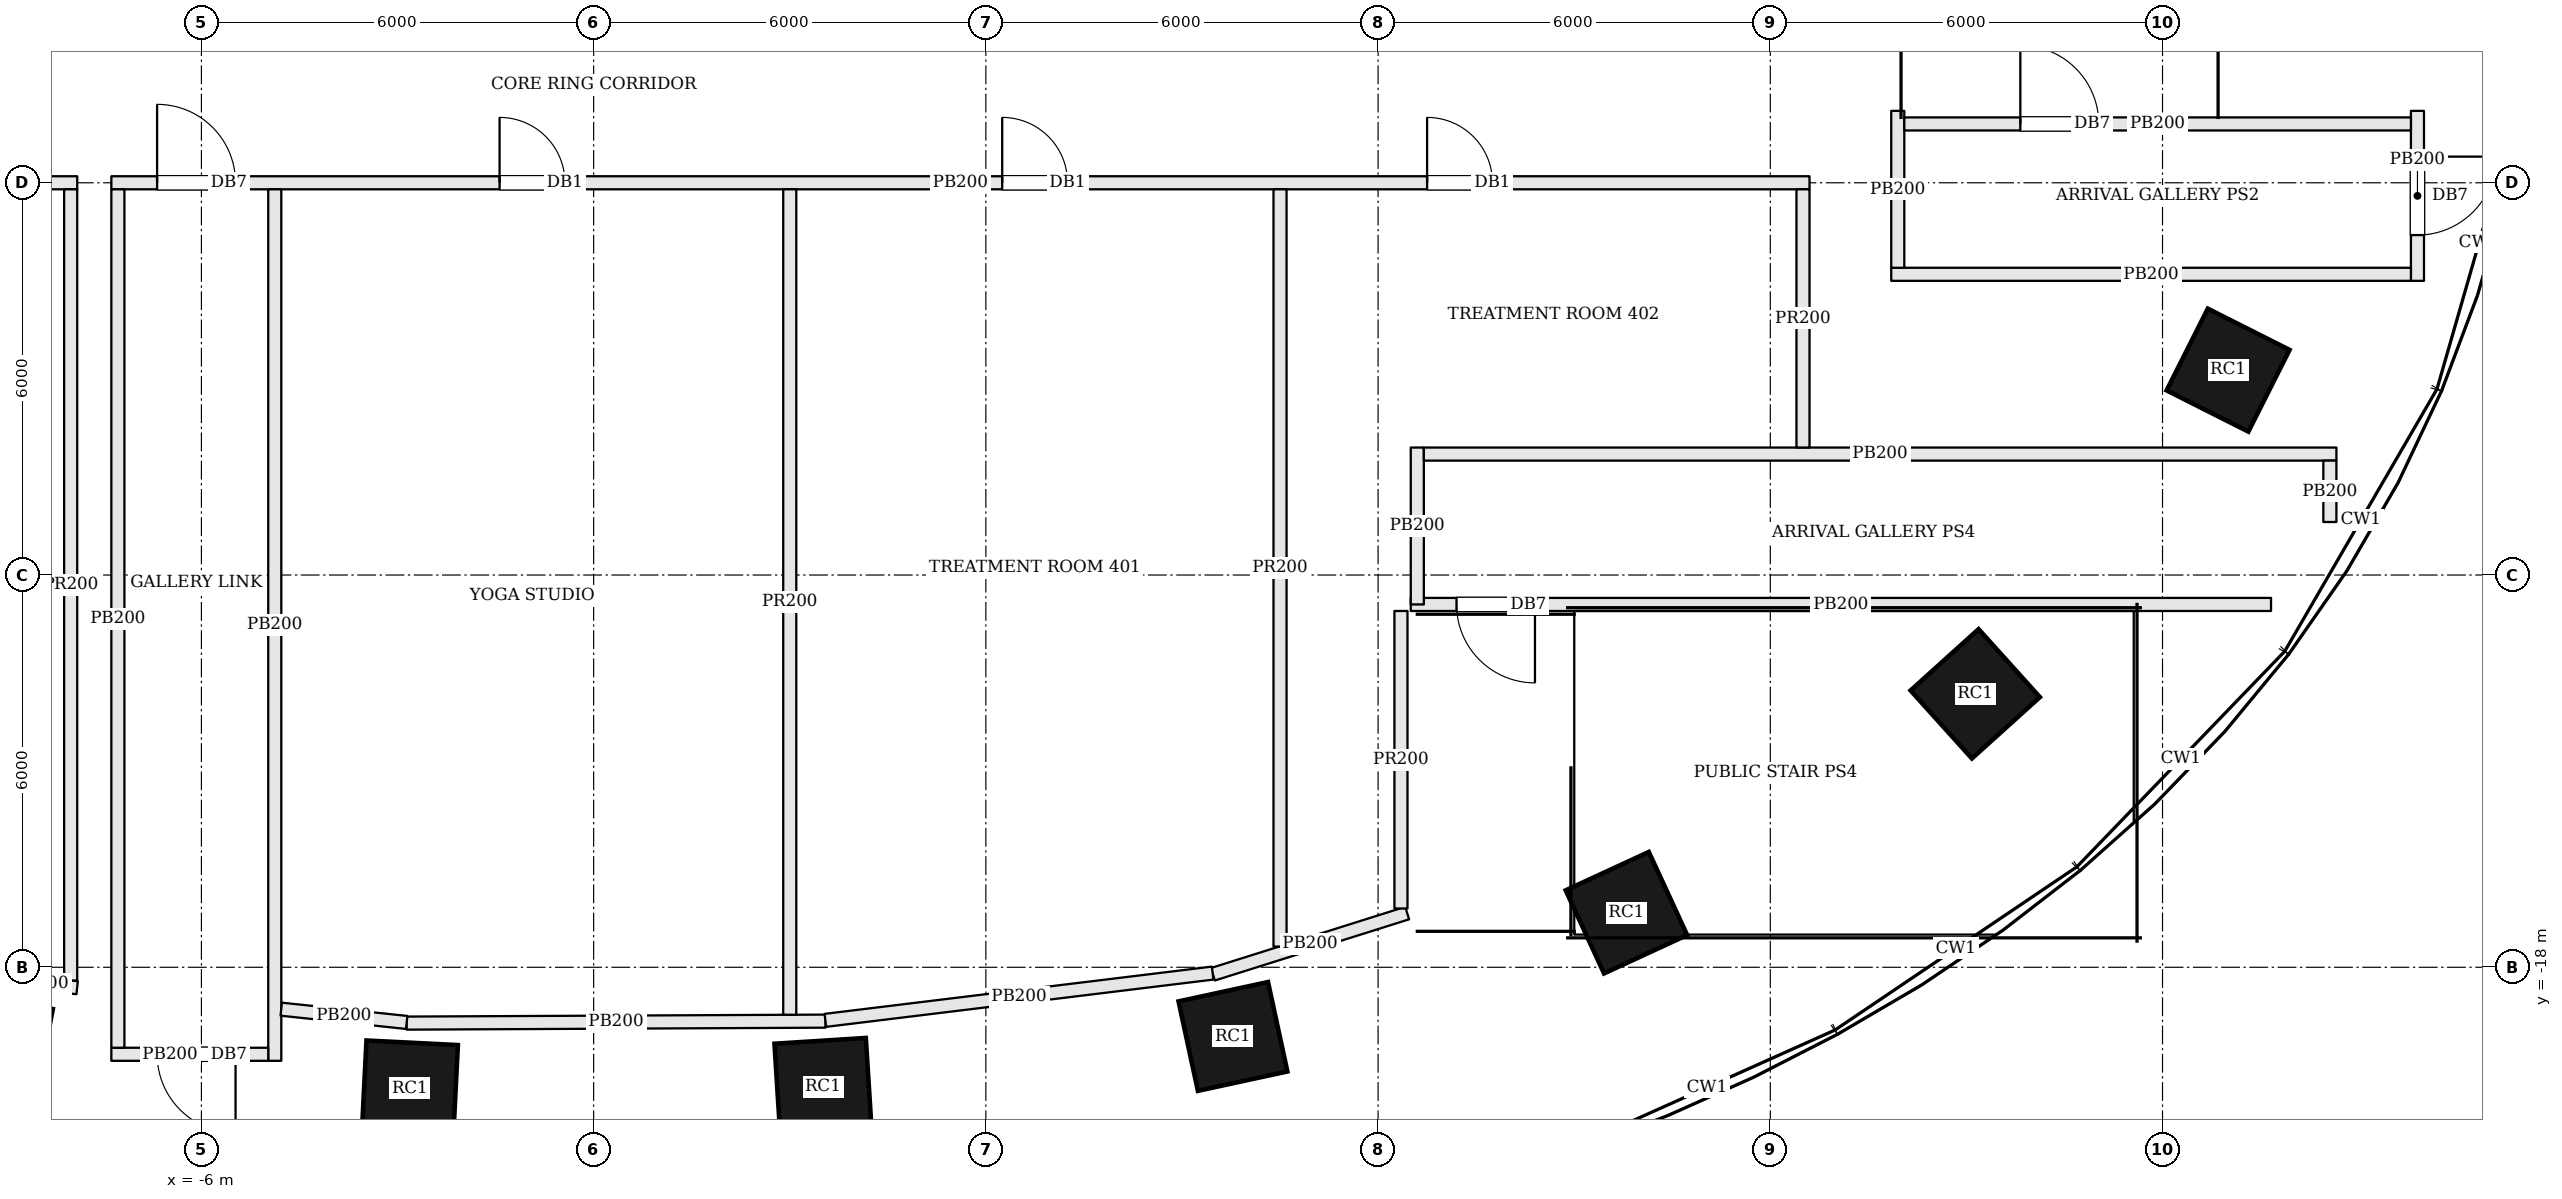
"""IFC4 building model, lengths in metres.
Left out: names, types, materials, properties, quantities, classifications, styles, units other than length and angle.
Written with IfcOpenShell. Run it as: python <this file> out.ifc"""

import sys

from ifc_helpers import new_model, si_unit, direction, frame, frame_2d, origin, origin_2d, place, context, subcontext, project, spatial, rectangle, extrude, element, fill, save


model = new_model("IFC4")
c1 = context("Model", 3, precision=1e-05, world=origin(), true_north=direction((0.0, 1.0)))
c2 = subcontext(c1, "Body", "Model", "MODEL_VIEW")
j1 = project(units=[si_unit("LENGTHUNIT", "METRE"), si_unit("PLANEANGLEUNIT", "RADIAN")], contexts=[c1])
p1 = place(None, origin())
s1 = spatial("IfcSite", under=j1, at=p1, CompositionType="ELEMENT")
p2 = place(p1, origin())
s2 = spatial("IfcBuilding", under=s1, at=p2, CompositionType="ELEMENT")
p3 = place(p2, frame((0.0, 0.0, 28.2)))
s3 = spatial("IfcBuildingStorey", under=s2, at=p3, CompositionType="ELEMENT", Elevation=28.2)
for number, where, z_axis, x_axis in (
    (1, (-9.094, -19.192, 0.0), (0.0, 0.0, 1.0), (0.981, -0.192, 0.0)),
    (2, (-2.811, -19.854, 0.0), (0.0, 0.0, 1.0), (0.999, -0.05, 0.0)),
    (3, (3.509, -19.824, 0.0), (0.0, 0.0, 1.0), (0.998, 0.063, 0.0)),
    (4, (9.78, -19.058, 0.0), (0.0, 0.0, 1.0), (0.977, 0.211, 0.0)),
    (5, (15.799, -17.165, 0.0), (0.0, 0.0, 1.0), (0.908, 0.419, 0.0)),
    (6, (21.135, -13.817, 0.0), (0.0, 0.0, 1.0), (0.743, 0.67, 0.0)),
    (7, (25.003, -8.866, 0.0), (0.0, 0.0, 1.0), (0.45, 0.893, 0.0)),
):
    element("IfcColumn", number, at=place(p3, frame(where, z_axis=z_axis, x_axis=x_axis)), inside=s3, PredefinedType="COLUMN", context=c2, shape_type="SweptSolid", body=[
        extrude(rectangle(XDim=1.4, YDim=1.4, at=origin_2d()), origin(), (0.0, 0.0, 1.0), 4.8),
    ])
p4 = place(p3, frame((27.9, -4.9, 0.0), z_axis=(0.0, 0.0, 1.0), x_axis=(0.0, -1.0, 0.0)))
e8 = element("IfcWall", 8, at=p4, inside=s3, PredefinedType="PARTITIONING", context=c2, shape_type="SweptSolid", body=[
    extrude(rectangle(XDim=2.6, YDim=0.2, at=frame_2d((1.3, 0.0))), origin(), (0.0, 0.0, 1.0), 3.78),
])
p5 = place(p4, frame((0.7, 0.0, 0.0)))
e9 = element("IfcOpeningElement", 9, at=p5, cuts=e8, PredefinedType="OPENING", context=c2, shape_type="SweptSolid", body=[
    extrude(rectangle(XDim=1.2, YDim=2.1, at=frame_2d((0.6, 1.05))), frame((0.0, 0.11, 0.0), z_axis=(0.0, -1.0, 0.0), x_axis=(1.0, 0.0, 0.0)), (0.0, 0.0, 1.0), 0.22),
])
p6 = place(p3, frame((27.8, -7.4, 0.0), z_axis=(0.0, 0.0, 1.0), x_axis=(-1.0, 0.0, 0.0)))
e10 = element("IfcWall", 10, at=p6, inside=s3, PredefinedType="PARTITIONING", context=c2, shape_type="SweptSolid", body=[
    extrude(rectangle(XDim=7.95, YDim=0.2, at=frame_2d((3.975, 0.0))), origin(), (0.0, 0.0, 1.0), 3.78),
])
p7 = place(p3, frame((19.95, -7.3, 0.0), z_axis=(0.0, 0.0, 1.0), x_axis=(0.0, 1.0, 0.0)))
e11 = element("IfcWall", 11, at=p7, inside=s3, PredefinedType="PARTITIONING", context=c2, shape_type="SweptSolid", body=[
    extrude(rectangle(XDim=2.4, YDim=0.2, at=frame_2d((1.2, 0.0))), origin(), (0.0, 0.0, 1.0), 3.78),
])
p8 = place(p3, frame((20.05, -5.1, 0.0), z_axis=(0.0, 0.0, 1.0), x_axis=(1.0, 0.0, 0.0)))
e12 = element("IfcWall", 12, at=p8, inside=s3, PredefinedType="PARTITIONING", context=c2, shape_type="SweptSolid", body=[
    extrude(rectangle(XDim=7.75, YDim=0.2, at=frame_2d((3.875, 0.0))), origin(), (0.0, 0.0, 1.0), 3.78),
])
p9 = place(p8, frame((1.775, 0.0, 0.0)))
e13 = element("IfcOpeningElement", 13, at=p9, cuts=e12, PredefinedType="OPENING", context=c2, shape_type="SweptSolid", body=[
    extrude(rectangle(XDim=1.2, YDim=2.1, at=frame_2d((0.6, 1.05))), frame((0.0, 0.11, 0.0), z_axis=(0.0, -1.0, 0.0), x_axis=(1.0, 0.0, 0.0)), (0.0, 0.0, 1.0), 0.22),
])
p10 = place(p3, frame((25.66, -12.45, 0.0), z_axis=(0.0, 0.0, 1.0), x_axis=(-1.0, 0.0, 0.0)))
e14 = element("IfcWall", 14, at=p10, inside=s3, PredefinedType="PARTITIONING", context=c2, shape_type="SweptSolid", body=[
    extrude(rectangle(XDim=13.16, YDim=0.2, at=frame_2d((6.58, 0.0))), origin(), (0.0, 0.0, 1.0), 3.78),
])
p11 = place(p10, frame((11.26, 0.0, 0.0)))
e15 = element("IfcOpeningElement", 15, at=p11, cuts=e14, PredefinedType="OPENING", context=c2, shape_type="SweptSolid", body=[
    extrude(rectangle(XDim=1.2, YDim=2.1, at=frame_2d((0.6, 1.05))), frame((0.0, 0.11, 0.0), z_axis=(0.0, -1.0, 0.0), x_axis=(1.0, 0.0, 0.0)), (0.0, 0.0, 1.0), 0.22),
])
p12 = place(p3, frame((12.6, -12.45, 0.0), z_axis=(0.0, 0.0, 1.0), x_axis=(0.0, 1.0, 0.0)))
e16 = element("IfcWall", 16, at=p12, inside=s3, PredefinedType="PARTITIONING", context=c2, shape_type="SweptSolid", body=[
    extrude(rectangle(XDim=2.4, YDim=0.2, at=frame_2d((1.2, 0.0))), origin(), (0.0, 0.0, 1.0), 3.78),
])
p13 = place(p3, frame((12.7, -10.15, 0.0), z_axis=(0.0, 0.0, 1.0), x_axis=(1.0, 0.0, 0.0)))
e17 = element("IfcWall", 17, at=p13, inside=s3, PredefinedType="PARTITIONING", context=c2, shape_type="SweptSolid", body=[
    extrude(rectangle(XDim=13.96, YDim=0.2, at=frame_2d((6.98, 0.0))), origin(), (0.0, 0.0, 1.0), 3.78),
])
p14 = place(p3, frame((26.56, -10.25, 0.0), z_axis=(0.0, 0.0, 1.0), x_axis=(0.0, -1.0, 0.0)))
e18 = element("IfcWall", 18, at=p14, inside=s3, PredefinedType="PARTITIONING", context=c2, shape_type="SweptSolid", body=[
    extrude(rectangle(XDim=0.939, YDim=0.2, at=frame_2d((0.469, 0.0))), origin(), (0.0, 0.0, 1.0), 3.78),
])
p15 = place(p3, frame((-7.378, -6.0, 0.0), z_axis=(0.0, 0.0, 1.0), x_axis=(1.0, 0.0, 0.0)))
e19 = element("IfcWall", 19, at=p15, inside=s3, PredefinedType="PARTITIONING", context=c2, shape_type="SweptSolid", body=[
    extrude(rectangle(XDim=25.978, YDim=0.2, at=frame_2d((12.989, 0.0))), origin(), (0.0, 0.0, 1.0), 3.78),
])
p16 = place(p15, frame((0.7, 0.0, 0.0)))
e20 = element("IfcOpeningElement", 20, at=p16, cuts=e19, PredefinedType="OPENING", context=c2, shape_type="SweptSolid", body=[
    extrude(rectangle(XDim=1.2, YDim=2.1, at=frame_2d((0.6, 1.05))), frame((0.0, 0.11, 0.0), z_axis=(0.0, -1.0, 0.0), x_axis=(1.0, 0.0, 0.0)), (0.0, 0.0, 1.0), 0.22),
])
p17 = place(p15, frame((5.939, 0.0, 0.0)))
e21 = element("IfcOpeningElement", 21, at=p17, cuts=e19, PredefinedType="OPENING", context=c2, shape_type="SweptSolid", body=[
    extrude(rectangle(XDim=1.0, YDim=2.1, at=frame_2d((0.5, 1.05))), frame((0.0, 0.11, 0.0), z_axis=(0.0, -1.0, 0.0), x_axis=(1.0, 0.0, 0.0)), (0.0, 0.0, 1.0), 0.22),
])
p18 = place(p15, frame((13.628, 0.0, 0.0)))
e22 = element("IfcOpeningElement", 22, at=p18, cuts=e19, PredefinedType="OPENING", context=c2, shape_type="SweptSolid", body=[
    extrude(rectangle(XDim=1.0, YDim=2.1, at=frame_2d((0.5, 1.05))), frame((0.0, 0.11, 0.0), z_axis=(0.0, -1.0, 0.0), x_axis=(1.0, 0.0, 0.0)), (0.0, 0.0, 1.0), 0.22),
])
p19 = place(p15, frame((20.128, 0.0, 0.0)))
e23 = element("IfcOpeningElement", 23, at=p19, cuts=e19, PredefinedType="OPENING", context=c2, shape_type="SweptSolid", body=[
    extrude(rectangle(XDim=1.0, YDim=2.1, at=frame_2d((0.5, 1.05))), frame((0.0, 0.11, 0.0), z_axis=(0.0, -1.0, 0.0), x_axis=(1.0, 0.0, 0.0)), (0.0, 0.0, 1.0), 0.22),
])
p20 = place(p3, frame((-4.878, -6.1, 0.0), z_axis=(0.0, 0.0, 1.0), x_axis=(0.0, -1.0, 0.0)))
e24 = element("IfcWall", 24, at=p20, inside=s3, PredefinedType="PARTITIONING", context=c2, shape_type="SweptSolid", body=[
    extrude(rectangle(XDim=13.331, YDim=0.2, at=frame_2d((6.666, 0.0))), origin(), (0.0, 0.0, 1.0), 3.78),
])
p21 = place(p3, frame((-4.978, -19.331, 0.0), z_axis=(0.0, 0.0, 1.0), x_axis=(-1.0, 0.0, 0.0)))
e25 = element("IfcWall", 25, at=p21, inside=s3, PredefinedType="PARTITIONING", context=c2, shape_type="SweptSolid", body=[
    extrude(rectangle(XDim=2.4, YDim=0.2, at=frame_2d((1.2, 0.0))), origin(), (0.0, 0.0, 1.0), 3.78),
])
p22 = place(p21, frame((0.5, 0.0, 0.0)))
e26 = element("IfcOpeningElement", 26, at=p22, cuts=e25, PredefinedType="OPENING", context=c2, shape_type="SweptSolid", body=[
    extrude(rectangle(XDim=1.2, YDim=2.1, at=frame_2d((0.6, 1.05))), frame((0.0, 0.11, 0.0), z_axis=(0.0, -1.0, 0.0), x_axis=(1.0, 0.0, 0.0)), (0.0, 0.0, 1.0), 0.22),
])
p23 = place(p3, frame((-7.278, -19.231, 0.0), z_axis=(0.0, 0.0, 1.0), x_axis=(0.0, 1.0, 0.0)))
e27 = element("IfcWall", 27, at=p23, inside=s3, PredefinedType="PARTITIONING", context=c2, shape_type="SweptSolid", body=[
    extrude(rectangle(XDim=13.131, YDim=0.2, at=frame_2d((6.565, 0.0))), origin(), (0.0, 0.0, 1.0), 3.78),
])
p24 = place(p3, frame((-7.901, -18.312, 0.0), z_axis=(0.0, 0.0, 1.0), x_axis=(-0.994571829754, 0.104052272726, 0.0)))
e28 = element("IfcWall", 28, at=p24, inside=s3, PredefinedType="PARTITIONING", context=c2, shape_type="SweptSolid", body=[
    extrude(rectangle(XDim=1.105, YDim=0.2, at=frame_2d((0.553, 0.0))), origin(), (0.0, 0.0, 1.0), 3.78),
])
p25 = place(p3, frame((-19.85, -6.0, 0.0), z_axis=(0.0, 0.0, 1.0), x_axis=(1.0, 0.0, 0.0)))
e29 = element("IfcWall", 29, at=p25, inside=s3, PredefinedType="PARTITIONING", context=c2, shape_type="SweptSolid", body=[
    extrude(rectangle(XDim=11.95, YDim=0.2, at=frame_2d((5.975, 0.0))), origin(), (0.0, 0.0, 1.0), 3.78),
])
p26 = place(p25, frame((7.35, 0.0, 0.0)))
e30 = element("IfcOpeningElement", 30, at=p26, cuts=e29, PredefinedType="OPENING", context=c2, shape_type="SweptSolid", body=[
    extrude(rectangle(XDim=1.0, YDim=2.1, at=frame_2d((0.5, 1.05))), frame((0.0, 0.11, 0.0), z_axis=(0.0, -1.0, 0.0), x_axis=(1.0, 0.0, 0.0)), (0.0, 0.0, 1.0), 0.22),
])
p27 = place(p3, frame((-8.0, -6.1, 0.0), z_axis=(0.0, 0.0, 1.0), x_axis=(0.0, -1.0, 0.0)))
e31 = element("IfcWall", 31, at=p27, inside=s3, PredefinedType="PARTITIONING", context=c2, shape_type="SweptSolid", body=[
    extrude(rectangle(XDim=12.102, YDim=0.2, at=frame_2d((6.051, 0.0))), origin(), (0.0, 0.0, 1.0), 3.78),
])
p28 = place(p3, frame((3.546, -18.824, 0.0), z_axis=(0.0, 0.0, 1.0), x_axis=(-0.999989016365, -0.004686912663, 0.0)))
e32 = element("IfcWall", 32, at=p28, inside=s3, PredefinedType="PARTITIONING", context=c2, shape_type="SweptSolid", body=[
    extrude(rectangle(XDim=6.407, YDim=0.2, at=frame_2d((3.204, 0.0))), origin(), (0.0, 0.0, 1.0), 3.78),
])
p29 = place(p3, frame((-2.86, -18.844, 0.0), z_axis=(0.0, 0.0, 1.0), x_axis=(-0.994457513639, 0.105139210412, 0.0)))
e33 = element("IfcWall", 33, at=p29, inside=s3, PredefinedType="PARTITIONING", context=c2, shape_type="SweptSolid", body=[
    extrude(rectangle(XDim=1.93, YDim=0.2, at=frame_2d((0.965, 0.0))), origin(), (0.0, 0.0, 1.0), 3.78),
])
p30 = place(p3, frame((3.0, -6.1, 0.0), z_axis=(0.0, 0.0, 1.0), x_axis=(0.0, -1.0, 0.0)))
e34 = element("IfcWall", 34, at=p30, inside=s3, PredefinedType="PARTITIONING", context=c2, shape_type="SweptSolid", body=[
    extrude(rectangle(XDim=12.626, YDim=0.2, at=frame_2d((6.313, 0.0))), origin(), (0.0, 0.0, 1.0), 3.78),
])
p31 = place(p3, frame((12.445, -17.171, 0.0), z_axis=(0.0, 0.0, 1.0), x_axis=(-0.953816830096, -0.300388839049, 0.0)))
e35 = element("IfcWall", 35, at=p31, inside=s3, PredefinedType="PARTITIONING", context=c2, shape_type="SweptSolid", body=[
    extrude(rectangle(XDim=3.116, YDim=0.2, at=frame_2d((1.558, 0.0))), origin(), (0.0, 0.0, 1.0), 3.78),
])
p32 = place(p3, frame((9.469, -18.089, 0.0), z_axis=(0.0, 0.0, 1.0), x_axis=(-0.992636762719, -0.121129093526, 0.0)))
e36 = element("IfcWall", 36, at=p32, inside=s3, PredefinedType="PARTITIONING", context=c2, shape_type="SweptSolid", body=[
    extrude(rectangle(XDim=5.968, YDim=0.2, at=frame_2d((2.984, 0.0))), origin(), (0.0, 0.0, 1.0), 3.78),
])
p33 = place(p3, frame((10.5, -6.1, 0.0), z_axis=(0.0, 0.0, 1.0), x_axis=(0.0, -1.0, 0.0)))
e37 = element("IfcWall", 37, at=p33, inside=s3, PredefinedType="PARTITIONING", context=c2, shape_type="SweptSolid", body=[
    extrude(rectangle(XDim=11.583, YDim=0.2, at=frame_2d((5.792, 0.0))), origin(), (0.0, 0.0, 1.0), 3.78),
])
p34 = place(p3, frame((18.5, -6.1, 0.0), z_axis=(0.0, 0.0, 1.0), x_axis=(0.0, -1.0, 0.0)))
e38 = element("IfcWall", 38, at=p34, inside=s3, PredefinedType="PARTITIONING", context=c2, shape_type="SweptSolid", body=[
    extrude(rectangle(XDim=3.95, YDim=0.2, at=frame_2d((1.975, 0.0))), origin(), (0.0, 0.0, 1.0), 3.78),
])
p35 = place(p3, frame((12.35, -12.55, 0.0), z_axis=(0.0, 0.0, 1.0), x_axis=(0.0, -1.0, 0.0)))
e39 = element("IfcWall", 39, at=p35, inside=s3, PredefinedType="PARTITIONING", context=c2, shape_type="SweptSolid", body=[
    extrude(rectangle(XDim=4.551, YDim=0.2, at=frame_2d((2.275, 0.0))), origin(), (0.0, 0.0, 1.0), 3.78),
])
p36 = place(p16, origin())
e40 = element("IfcDoor", 40, at=p36, inside=s3, OperationType="SINGLE_SWING_LEFT", PredefinedType="DOOR", context=c2, shape_type="SweptSolid", body=[
    extrude(rectangle(XDim=1.2, YDim=2.1, at=frame_2d((0.6, 1.05))), frame((0.0, 0.025, 0.0), z_axis=(0.0, -1.0, 0.0), x_axis=(1.0, 0.0, 0.0)), (0.0, 0.0, 1.0), 0.05),
])
fill(e20, e40)
p37 = place(p22, origin())
e41 = element("IfcDoor", 41, at=p37, inside=s3, OperationType="SINGLE_SWING_LEFT", PredefinedType="DOOR", context=c2, shape_type="SweptSolid", body=[
    extrude(rectangle(XDim=1.2, YDim=2.1, at=frame_2d((0.6, 1.05))), frame((0.0, 0.025, 0.0), z_axis=(0.0, -1.0, 0.0), x_axis=(1.0, 0.0, 0.0)), (0.0, 0.0, 1.0), 0.05),
])
fill(e26, e41)
p38 = place(p9, origin())
e42 = element("IfcDoor", 42, at=p38, inside=s3, OperationType="SINGLE_SWING_LEFT", PredefinedType="DOOR", context=c2, shape_type="SweptSolid", body=[
    extrude(rectangle(XDim=1.2, YDim=2.1, at=frame_2d((0.6, 1.05))), frame((0.0, 0.025, 0.0), z_axis=(0.0, -1.0, 0.0), x_axis=(1.0, 0.0, 0.0)), (0.0, 0.0, 1.0), 0.05),
])
fill(e13, e42)
p39 = place(p5, origin())
e43 = element("IfcDoor", 43, at=p39, inside=s3, OperationType="SINGLE_SWING_LEFT", PredefinedType="DOOR", context=c2, shape_type="SweptSolid", body=[
    extrude(rectangle(XDim=1.2, YDim=2.1, at=frame_2d((0.6, 1.05))), frame((0.0, 0.025, 0.0), z_axis=(0.0, -1.0, 0.0), x_axis=(1.0, 0.0, 0.0)), (0.0, 0.0, 1.0), 0.05),
])
fill(e9, e43)
p40 = place(p11, origin())
e44 = element("IfcDoor", 44, at=p40, inside=s3, OperationType="SINGLE_SWING_LEFT", PredefinedType="DOOR", context=c2, shape_type="SweptSolid", body=[
    extrude(rectangle(XDim=1.2, YDim=2.1, at=frame_2d((0.6, 1.05))), frame((0.0, 0.025, 0.0), z_axis=(0.0, -1.0, 0.0), x_axis=(1.0, 0.0, 0.0)), (0.0, 0.0, 1.0), 0.05),
])
fill(e15, e44)
p41 = place(p17, origin())
e45 = element("IfcDoor", 45, at=p41, inside=s3, OperationType="SINGLE_SWING_LEFT", PredefinedType="DOOR", context=c2, shape_type="SweptSolid", body=[
    extrude(rectangle(XDim=1.0, YDim=2.1, at=frame_2d((0.5, 1.05))), frame((0.0, 0.025, 0.0), z_axis=(0.0, -1.0, 0.0), x_axis=(1.0, 0.0, 0.0)), (0.0, 0.0, 1.0), 0.05),
])
fill(e21, e45)
p42 = place(p18, origin())
e46 = element("IfcDoor", 46, at=p42, inside=s3, OperationType="SINGLE_SWING_LEFT", PredefinedType="DOOR", context=c2, shape_type="SweptSolid", body=[
    extrude(rectangle(XDim=1.0, YDim=2.1, at=frame_2d((0.5, 1.05))), frame((0.0, 0.025, 0.0), z_axis=(0.0, -1.0, 0.0), x_axis=(1.0, 0.0, 0.0)), (0.0, 0.0, 1.0), 0.05),
])
fill(e22, e46)
p43 = place(p19, origin())
e47 = element("IfcDoor", 47, at=p43, inside=s3, OperationType="SINGLE_SWING_LEFT", PredefinedType="DOOR", context=c2, shape_type="SweptSolid", body=[
    extrude(rectangle(XDim=1.0, YDim=2.1, at=frame_2d((0.5, 1.05))), frame((0.0, 0.025, 0.0), z_axis=(0.0, -1.0, 0.0), x_axis=(1.0, 0.0, 0.0)), (0.0, 0.0, 1.0), 0.05),
])
fill(e23, e47)
save(model, sys.argv[1])
